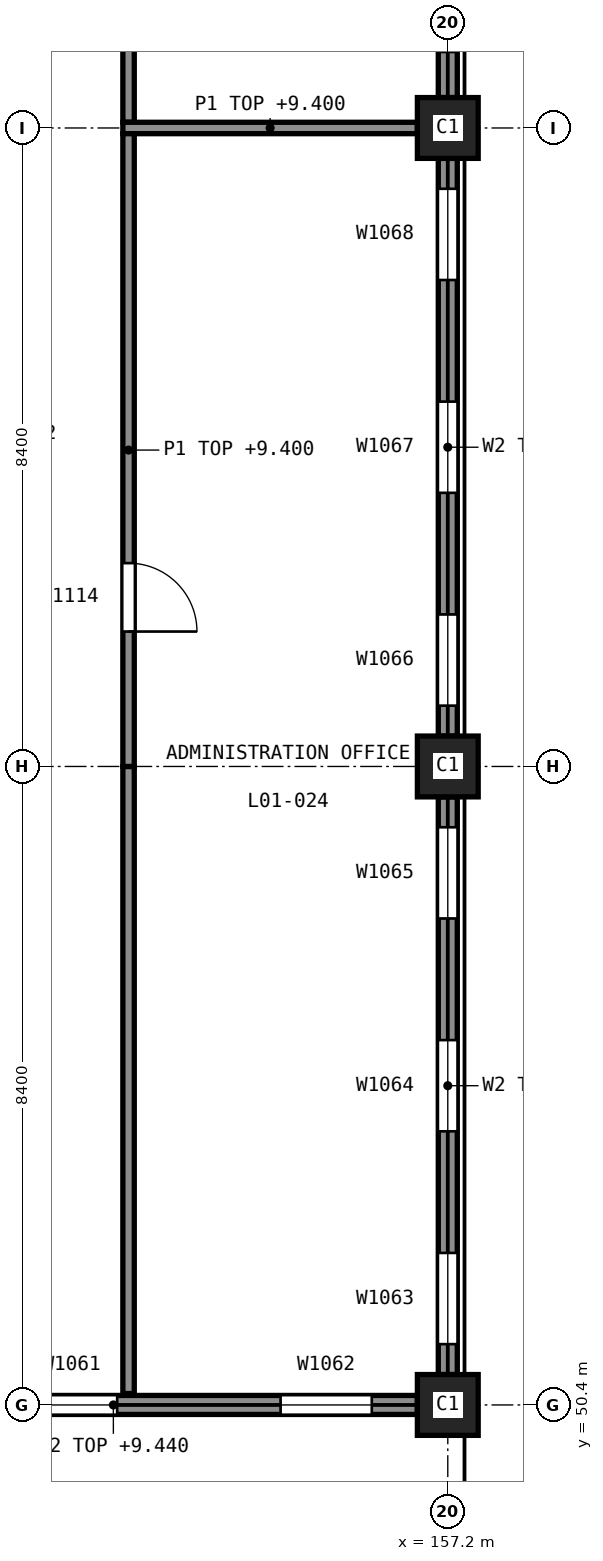
"""IFC4 building model, lengths in metres.
Left out: names, types, materials, properties, quantities, classifications, styles, units other than length and angle.
Written with IfcOpenShell. Run it as: python <this file> out.ifc"""

import sys

from ifc_helpers import new_model, si_unit, direction, frame, frame_2d, origin, origin_2d, place, context, subcontext, project, spatial, rectangle, extrude, element, fill, save


model = new_model("IFC4")
c1 = context("Model", 3, precision=1e-05, world=origin(), true_north=direction((0.0, 1.0)))
c2 = subcontext(c1, "Body", "Model", "MODEL_VIEW")
j1 = project(units=[si_unit("LENGTHUNIT", "METRE"), si_unit("PLANEANGLEUNIT", "RADIAN")], contexts=[c1])
p1 = place(None, origin())
s1 = spatial("IfcSite", under=j1, at=p1, CompositionType="ELEMENT")
p2 = place(p1, origin())
s2 = spatial("IfcBuilding", under=s1, at=p2, CompositionType="ELEMENT")
p3 = place(p2, frame((0.0, 0.0, 5.5)))
s3 = spatial("IfcBuildingStorey", under=s2, at=p3, CompositionType="ELEMENT", Elevation=5.5)
for number, where, z_axis, x_axis in (
    (1, (157.2, 50.4, 0.0), (0.0, 0.0, 1.0), (1.0, 0.0, 0.0)),
    (2, (157.2, 58.8, 0.0), (0.0, 0.0, 1.0), (1.0, 0.0, 0.0)),
    (3, (157.2, 67.2, 0.0), (0.0, 0.0, 1.0), (1.0, 0.0, 0.0)),
):
    element("IfcColumn", number, at=place(p3, frame(where, z_axis=z_axis, x_axis=x_axis)), inside=s3, PredefinedType="COLUMN", context=c2, shape_type="SweptSolid", body=[
        extrude(rectangle(XDim=0.8, YDim=0.8, at=origin_2d()), origin(), (0.0, 0.0, 1.0), 5.0),
    ])
p4 = place(p3, frame((148.8, 50.4, 0.0), z_axis=(0.0, 0.0, 1.0), x_axis=(1.0, 0.0, 0.0)))
e4 = element("IfcWall", 4, at=p4, inside=s3, PredefinedType="SOLIDWALL", context=c2, shape_type="SweptSolid", body=[
    extrude(rectangle(XDim=8.0, YDim=0.25, at=frame_2d((4.0, 0.0))), origin(), (0.0, 0.0, 1.0), 3.94),
])
p5 = place(p4, frame((0.6, 0.0, 0.9)))
e5 = element("IfcOpeningElement", 5, at=p5, cuts=e4, PredefinedType="OPENING", context=c2, shape_type="SweptSolid", body=[
    extrude(rectangle(XDim=1.2, YDim=2.1, at=frame_2d((0.6, 1.05))), frame((0.0, 0.135, 0.0), z_axis=(0.0, -1.0, 0.0), x_axis=(1.0, 0.0, 0.0)), (0.0, 0.0, 1.0), 0.27),
])
p6 = place(p4, frame((2.85, 0.0, 0.9)))
e6 = element("IfcOpeningElement", 6, at=p6, cuts=e4, PredefinedType="OPENING", context=c2, shape_type="SweptSolid", body=[
    extrude(rectangle(XDim=1.2, YDim=2.1, at=frame_2d((0.6, 1.05))), frame((0.0, 0.135, 0.0), z_axis=(0.0, -1.0, 0.0), x_axis=(1.0, 0.0, 0.0)), (0.0, 0.0, 1.0), 0.27),
])
p7 = place(p4, frame((6.2, 0.0, 0.9)))
e7 = element("IfcOpeningElement", 7, at=p7, cuts=e4, PredefinedType="OPENING", context=c2, shape_type="SweptSolid", body=[
    extrude(rectangle(XDim=1.2, YDim=2.1, at=frame_2d((0.6, 1.05))), frame((0.0, 0.135, 0.0), z_axis=(0.0, -1.0, 0.0), x_axis=(1.0, 0.0, 0.0)), (0.0, 0.0, 1.0), 0.27),
])
p8 = place(p3, frame((157.2, 50.8, 0.0), z_axis=(0.0, 0.0, 1.0), x_axis=(0.0, 1.0, 0.0)))
e8 = element("IfcWall", 8, at=p8, inside=s3, PredefinedType="SOLIDWALL", context=c2, shape_type="SweptSolid", body=[
    extrude(rectangle(XDim=7.6, YDim=0.25, at=frame_2d((3.8, 0.0))), origin(), (0.0, 0.0, 1.0), 3.94),
])
p9 = place(p8, frame((0.4, 0.0, 0.9)))
e9 = element("IfcOpeningElement", 9, at=p9, cuts=e8, PredefinedType="OPENING", context=c2, shape_type="SweptSolid", body=[
    extrude(rectangle(XDim=1.2, YDim=2.1, at=frame_2d((0.6, 1.05))), frame((0.0, 0.135, 0.0), z_axis=(0.0, -1.0, 0.0), x_axis=(1.0, 0.0, 0.0)), (0.0, 0.0, 1.0), 0.27),
])
p10 = place(p8, frame((3.2, 0.0, 0.9)))
e10 = element("IfcOpeningElement", 10, at=p10, cuts=e8, PredefinedType="OPENING", context=c2, shape_type="SweptSolid", body=[
    extrude(rectangle(XDim=1.2, YDim=2.1, at=frame_2d((0.6, 1.05))), frame((0.0, 0.135, 0.0), z_axis=(0.0, -1.0, 0.0), x_axis=(1.0, 0.0, 0.0)), (0.0, 0.0, 1.0), 0.27),
])
p11 = place(p8, frame((6.0, 0.0, 0.9)))
e11 = element("IfcOpeningElement", 11, at=p11, cuts=e8, PredefinedType="OPENING", context=c2, shape_type="SweptSolid", body=[
    extrude(rectangle(XDim=1.2, YDim=2.1, at=frame_2d((0.6, 1.05))), frame((0.0, 0.135, 0.0), z_axis=(0.0, -1.0, 0.0), x_axis=(1.0, 0.0, 0.0)), (0.0, 0.0, 1.0), 0.27),
])
p12 = place(p3, frame((157.2, 59.2, 0.0), z_axis=(0.0, 0.0, 1.0), x_axis=(0.0, 1.0, 0.0)))
e12 = element("IfcWall", 12, at=p12, inside=s3, PredefinedType="SOLIDWALL", context=c2, shape_type="SweptSolid", body=[
    extrude(rectangle(XDim=7.6, YDim=0.25, at=frame_2d((3.8, 0.0))), origin(), (0.0, 0.0, 1.0), 3.94),
])
p13 = place(p12, frame((0.4, 0.0, 0.9)))
e13 = element("IfcOpeningElement", 13, at=p13, cuts=e12, PredefinedType="OPENING", context=c2, shape_type="SweptSolid", body=[
    extrude(rectangle(XDim=1.2, YDim=2.1, at=frame_2d((0.6, 1.05))), frame((0.0, 0.135, 0.0), z_axis=(0.0, -1.0, 0.0), x_axis=(1.0, 0.0, 0.0)), (0.0, 0.0, 1.0), 0.27),
])
p14 = place(p12, frame((3.2, 0.0, 0.9)))
e14 = element("IfcOpeningElement", 14, at=p14, cuts=e12, PredefinedType="OPENING", context=c2, shape_type="SweptSolid", body=[
    extrude(rectangle(XDim=1.2, YDim=2.1, at=frame_2d((0.6, 1.05))), frame((0.0, 0.135, 0.0), z_axis=(0.0, -1.0, 0.0), x_axis=(1.0, 0.0, 0.0)), (0.0, 0.0, 1.0), 0.27),
])
p15 = place(p12, frame((6.0, 0.0, 0.9)))
e15 = element("IfcOpeningElement", 15, at=p15, cuts=e12, PredefinedType="OPENING", context=c2, shape_type="SweptSolid", body=[
    extrude(rectangle(XDim=1.2, YDim=2.1, at=frame_2d((0.6, 1.05))), frame((0.0, 0.135, 0.0), z_axis=(0.0, -1.0, 0.0), x_axis=(1.0, 0.0, 0.0)), (0.0, 0.0, 1.0), 0.27),
])
p16 = place(p3, frame((157.2, 67.6, 0.0), z_axis=(0.0, 0.0, 1.0), x_axis=(0.0, 1.0, 0.0)))
e16 = element("IfcWall", 16, at=p16, inside=s3, PredefinedType="SOLIDWALL", context=c2, shape_type="SweptSolid", body=[
    extrude(rectangle(XDim=8.0, YDim=0.25, at=frame_2d((4.0, 0.0))), origin(), (0.0, 0.0, 1.0), 3.94),
])
p17 = place(p16, frame((0.6, 0.0, 0.9)))
e17 = element("IfcOpeningElement", 17, at=p17, cuts=e16, PredefinedType="OPENING", context=c2, shape_type="SweptSolid", body=[
    extrude(rectangle(XDim=1.2, YDim=2.1, at=frame_2d((0.6, 1.05))), frame((0.0, 0.135, 0.0), z_axis=(0.0, -1.0, 0.0), x_axis=(1.0, 0.0, 0.0)), (0.0, 0.0, 1.0), 0.27),
])
p18 = place(p16, frame((3.4, 0.0, 0.9)))
e18 = element("IfcOpeningElement", 18, at=p18, cuts=e16, PredefinedType="OPENING", context=c2, shape_type="SweptSolid", body=[
    extrude(rectangle(XDim=1.2, YDim=2.1, at=frame_2d((0.6, 1.05))), frame((0.0, 0.135, 0.0), z_axis=(0.0, -1.0, 0.0), x_axis=(1.0, 0.0, 0.0)), (0.0, 0.0, 1.0), 0.27),
])
p19 = place(p16, frame((6.2, 0.0, 0.9)))
e19 = element("IfcOpeningElement", 19, at=p19, cuts=e16, PredefinedType="OPENING", context=c2, shape_type="SweptSolid", body=[
    extrude(rectangle(XDim=1.2, YDim=2.1, at=frame_2d((0.6, 1.05))), frame((0.0, 0.135, 0.0), z_axis=(0.0, -1.0, 0.0), x_axis=(1.0, 0.0, 0.0)), (0.0, 0.0, 1.0), 0.27),
])
p20 = place(p3, frame((153.0, 67.275, 0.0), z_axis=(0.0, 0.0, 1.0), x_axis=(0.0, 1.0, 0.0)))
e20 = element("IfcWall", 20, at=p20, inside=s3, PredefinedType="PARTITIONING", context=c2, shape_type="SweptSolid", body=[
    extrude(rectangle(XDim=8.325, YDim=0.15, at=frame_2d((4.163, 0.0))), origin(), (0.0, 0.0, 1.0), 3.9),
])
p21 = place(p20, frame((5.65, 0.0, 0.0)))
e21 = element("IfcOpeningElement", 21, at=p21, cuts=e20, PredefinedType="OPENING", context=c2, shape_type="SweptSolid", body=[
    extrude(rectangle(XDim=0.9, YDim=2.1, at=frame_2d((0.45, 1.05))), frame((0.0, 0.085, 0.0), z_axis=(0.0, -1.0, 0.0), x_axis=(1.0, 0.0, 0.0)), (0.0, 0.0, 1.0), 0.17),
])
p22 = place(p3, frame((152.925, 67.2, 0.0), z_axis=(0.0, 0.0, 1.0), x_axis=(1.0, 0.0, 0.0)))
e22 = element("IfcWall", 22, at=p22, inside=s3, PredefinedType="PARTITIONING", context=c2, shape_type="SweptSolid", body=[
    extrude(rectangle(XDim=3.875, YDim=0.15, at=frame_2d((1.938, 0.0))), origin(), (0.0, 0.0, 1.0), 3.9),
])
p23 = place(p3, frame((153.0, 50.55, 0.0), z_axis=(0.0, 0.0, 1.0), x_axis=(0.0, 1.0, 0.0)))
e23 = element("IfcWall", 23, at=p23, inside=s3, PredefinedType="PARTITIONING", context=c2, shape_type="SweptSolid", body=[
    extrude(rectangle(XDim=8.25, YDim=0.15, at=frame_2d((4.125, 0.0))), origin(), (0.0, 0.0, 1.0), 3.9),
])
p24 = place(p3, frame((153.0, 58.8, 0.0), z_axis=(0.0, 0.0, 1.0), x_axis=(0.0, 1.0, 0.0)))
e24 = element("IfcWall", 24, at=p24, inside=s3, PredefinedType="PARTITIONING", context=c2, shape_type="SweptSolid", body=[
    extrude(rectangle(XDim=8.325, YDim=0.15, at=frame_2d((4.163, 0.0))), origin(), (0.0, 0.0, 1.0), 3.9),
])
p25 = place(p24, frame((1.775, 0.0, 0.0)))
e25 = element("IfcOpeningElement", 25, at=p25, cuts=e24, PredefinedType="OPENING", context=c2, shape_type="SweptSolid", body=[
    extrude(rectangle(XDim=0.9, YDim=2.1, at=frame_2d((0.45, 1.05))), frame((0.0, 0.085, 0.0), z_axis=(0.0, -1.0, 0.0), x_axis=(1.0, 0.0, 0.0)), (0.0, 0.0, 1.0), 0.17),
])
p26 = place(p6, origin())
e26 = element("IfcWindow", 26, at=p26, inside=s3, PartitioningType="SINGLE_PANEL", PredefinedType="WINDOW", context=c2, shape_type="SweptSolid", body=[
    extrude(rectangle(XDim=1.2, YDim=2.1, at=frame_2d((0.6, 1.05))), frame((0.0, 0.105, 0.0), z_axis=(0.0, -1.0, 0.0), x_axis=(1.0, 0.0, 0.0)), (0.0, 0.0, 1.0), 0.06),
])
fill(e6, e26)
p27 = place(p7, origin())
e27 = element("IfcWindow", 27, at=p27, inside=s3, PartitioningType="SINGLE_PANEL", PredefinedType="WINDOW", context=c2, shape_type="SweptSolid", body=[
    extrude(rectangle(XDim=1.2, YDim=2.1, at=frame_2d((0.6, 1.05))), frame((0.0, 0.105, 0.0), z_axis=(0.0, -1.0, 0.0), x_axis=(1.0, 0.0, 0.0)), (0.0, 0.0, 1.0), 0.06),
])
fill(e7, e27)
p28 = place(p9, origin())
e28 = element("IfcWindow", 28, at=p28, inside=s3, PartitioningType="SINGLE_PANEL", PredefinedType="WINDOW", context=c2, shape_type="SweptSolid", body=[
    extrude(rectangle(XDim=1.2, YDim=2.1, at=frame_2d((0.6, 1.05))), frame((0.0, 0.105, 0.0), z_axis=(0.0, -1.0, 0.0), x_axis=(1.0, 0.0, 0.0)), (0.0, 0.0, 1.0), 0.06),
])
fill(e9, e28)
p29 = place(p10, origin())
e29 = element("IfcWindow", 29, at=p29, inside=s3, PartitioningType="SINGLE_PANEL", PredefinedType="WINDOW", context=c2, shape_type="SweptSolid", body=[
    extrude(rectangle(XDim=1.2, YDim=2.1, at=frame_2d((0.6, 1.05))), frame((0.0, 0.105, 0.0), z_axis=(0.0, -1.0, 0.0), x_axis=(1.0, 0.0, 0.0)), (0.0, 0.0, 1.0), 0.06),
])
fill(e10, e29)
p30 = place(p11, origin())
e30 = element("IfcWindow", 30, at=p30, inside=s3, PartitioningType="SINGLE_PANEL", PredefinedType="WINDOW", context=c2, shape_type="SweptSolid", body=[
    extrude(rectangle(XDim=1.2, YDim=2.1, at=frame_2d((0.6, 1.05))), frame((0.0, 0.105, 0.0), z_axis=(0.0, -1.0, 0.0), x_axis=(1.0, 0.0, 0.0)), (0.0, 0.0, 1.0), 0.06),
])
fill(e11, e30)
p31 = place(p13, origin())
e31 = element("IfcWindow", 31, at=p31, inside=s3, PartitioningType="SINGLE_PANEL", PredefinedType="WINDOW", context=c2, shape_type="SweptSolid", body=[
    extrude(rectangle(XDim=1.2, YDim=2.1, at=frame_2d((0.6, 1.05))), frame((0.0, 0.105, 0.0), z_axis=(0.0, -1.0, 0.0), x_axis=(1.0, 0.0, 0.0)), (0.0, 0.0, 1.0), 0.06),
])
fill(e13, e31)
p32 = place(p14, origin())
e32 = element("IfcWindow", 32, at=p32, inside=s3, PartitioningType="SINGLE_PANEL", PredefinedType="WINDOW", context=c2, shape_type="SweptSolid", body=[
    extrude(rectangle(XDim=1.2, YDim=2.1, at=frame_2d((0.6, 1.05))), frame((0.0, 0.105, 0.0), z_axis=(0.0, -1.0, 0.0), x_axis=(1.0, 0.0, 0.0)), (0.0, 0.0, 1.0), 0.06),
])
fill(e14, e32)
p33 = place(p15, origin())
e33 = element("IfcWindow", 33, at=p33, inside=s3, PartitioningType="SINGLE_PANEL", PredefinedType="WINDOW", context=c2, shape_type="SweptSolid", body=[
    extrude(rectangle(XDim=1.2, YDim=2.1, at=frame_2d((0.6, 1.05))), frame((0.0, 0.105, 0.0), z_axis=(0.0, -1.0, 0.0), x_axis=(1.0, 0.0, 0.0)), (0.0, 0.0, 1.0), 0.06),
])
fill(e15, e33)
p34 = place(p25, origin())
e34 = element("IfcDoor", 34, at=p34, inside=s3, OperationType="SINGLE_SWING_LEFT", PredefinedType="DOOR", context=c2, shape_type="SweptSolid", body=[
    extrude(rectangle(XDim=0.9, YDim=2.1, at=frame_2d((0.45, 1.05))), frame((0.0, 0.025, 0.0), z_axis=(0.0, -1.0, 0.0), x_axis=(1.0, 0.0, 0.0)), (0.0, 0.0, 1.0), 0.05),
])
fill(e25, e34)
save(model, sys.argv[1])
